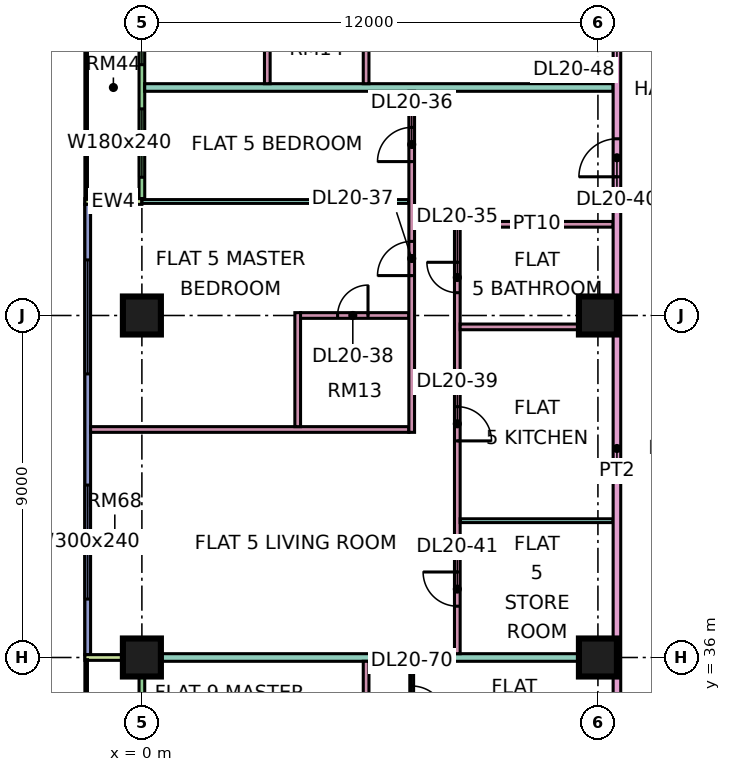
"""IFC4 building model, lengths in metres.
Left out: names, types, materials, properties, quantities, classifications, styles, units other than length and angle.
Written with IfcOpenShell. Run it as: python <this file> out.ifc"""

import sys

from ifc_helpers import new_model, si_unit, direction, frame, frame_2d, origin, origin_2d, place, context, subcontext, project, spatial, rectangle, extrude, element, fill, save


model = new_model("IFC4")
c1 = context("Model", 3, precision=1e-05, world=origin(), true_north=direction((0.0, 1.0)))
c2 = subcontext(c1, "Body", "Model", "MODEL_VIEW")
j1 = project(units=[si_unit("LENGTHUNIT", "METRE"), si_unit("PLANEANGLEUNIT", "RADIAN")], contexts=[c1])
p1 = place(None, origin())
s1 = spatial("IfcSite", under=j1, at=p1, CompositionType="ELEMENT")
p2 = place(p1, origin())
s2 = spatial("IfcBuilding", under=s1, at=p2, CompositionType="ELEMENT")
p3 = place(p2, frame((0.0, 0.0, 91.9)))
s3 = spatial("IfcBuildingStorey", under=s2, at=p3, CompositionType="ELEMENT", Elevation=91.9)
p4 = place(p3, frame((0.0, 36.0, 0.0), z_axis=(0.0, 0.0, 1.0), x_axis=(1.0, 0.0, 0.0)))
e1 = element("IfcColumn", 1, at=p4, inside=s3, PredefinedType="COLUMN", context=c2, shape_type="SweptSolid", body=[
    extrude(rectangle(XDim=1.0, YDim=1.0, at=origin_2d()), origin(), (0.0, 0.0, 1.0), 3.75),
])
for number, where, z_axis, x_axis in (
    (2, (0.0, 45.0, 0.0), (0.0, 0.0, 1.0), (1.0, 0.0, 0.0)),
    (3, (12.0, 36.0, 0.0), (0.0, 0.0, 1.0), (1.0, 0.0, 0.0)),
    (4, (12.0, 45.0, 0.0), (0.0, 0.0, 1.0), (1.0, 0.0, 0.0)),
):
    element("IfcColumn", number, at=place(p3, frame(where, z_axis=z_axis, x_axis=x_axis)), inside=s3, PredefinedType="COLUMN", context=c2, shape_type="SweptSolid", body=[
        extrude(rectangle(XDim=1.0, YDim=1.0, at=origin_2d()), origin(), (0.0, 0.0, 1.0), 3.75),
    ])
p5 = place(p3, frame((0.0, 61.425, 0.0), z_axis=(0.0, 0.0, 1.0), x_axis=(0.0, -1.0, 0.0)))
e5 = element("IfcWall", 5, at=p5, inside=s3, PredefinedType="SOLIDWALL", context=c2, shape_type="SweptSolid", body=[
    extrude(rectangle(XDim=13.35, YDim=0.15, at=frame_2d((6.675, 0.0))), origin(), (0.0, 0.0, 1.0), 3.35),
])
p6 = place(p5, frame((2.025, 0.0, 0.0)))
e6 = element("IfcOpeningElement", 6, at=p6, cuts=e5, PredefinedType="OPENING", context=c2, shape_type="SweptSolid", body=[
    extrude(rectangle(XDim=1.8, YDim=2.4, at=frame_2d((0.9, 1.2))), frame((0.0, 0.085, 0.0), z_axis=(0.0, -1.0, 0.0), x_axis=(1.0, 0.0, 0.0)), (0.0, 0.0, 1.0), 0.17),
])
p7 = place(p5, frame((5.025, 0.0, 0.45)))
e7 = element("IfcOpeningElement", 7, at=p7, cuts=e5, PredefinedType="OPENING", context=c2, shape_type="SweptSolid", body=[
    extrude(rectangle(XDim=1.2, YDim=2.4, at=frame_2d((0.6, 1.2))), frame((0.0, 0.085, 0.0), z_axis=(0.0, -1.0, 0.0), x_axis=(1.0, 0.0, 0.0)), (0.0, 0.0, 1.0), 0.17),
])
p8 = place(p5, frame((8.625, 0.0, 0.45)))
e8 = element("IfcOpeningElement", 8, at=p8, cuts=e5, PredefinedType="OPENING", context=c2, shape_type="SweptSolid", body=[
    extrude(rectangle(XDim=1.2, YDim=2.4, at=frame_2d((0.6, 1.2))), frame((0.0, 0.085, 0.0), z_axis=(0.0, -1.0, 0.0), x_axis=(1.0, 0.0, 0.0)), (0.0, 0.0, 1.0), 0.17),
])
p9 = place(p5, frame((10.988, 0.0, 0.45)))
e9 = element("IfcOpeningElement", 9, at=p9, cuts=e5, PredefinedType="OPENING", context=c2, shape_type="SweptSolid", body=[
    extrude(rectangle(XDim=1.8, YDim=2.4, at=frame_2d((0.9, 1.2))), frame((0.0, 0.085, 0.0), z_axis=(0.0, -1.0, 0.0), x_axis=(1.0, 0.0, 0.0)), (0.0, 0.0, 1.0), 0.17),
])
p10 = place(p3, frame((-1.5, 48.0, 0.0), z_axis=(0.0, 0.0, 1.0), x_axis=(1.0, 0.0, 0.0)))
e10 = element("IfcWall", 10, at=p10, inside=s3, PredefinedType="SOLIDWALL", context=c2, shape_type="SweptSolid", body=[
    extrude(rectangle(XDim=1.5, YDim=0.15, at=frame_2d((0.75, 0.0))), origin(), (0.0, 0.0, 1.0), 3.35),
])
p11 = place(p3, frame((-1.425, 47.925, 0.0), z_axis=(0.0, 0.0, 1.0), x_axis=(0.0, -1.0, 0.0)))
e11 = element("IfcWall", 11, at=p11, inside=s3, PredefinedType="SOLIDWALL", context=c2, shape_type="SweptSolid", body=[
    extrude(rectangle(XDim=11.85, YDim=0.15, at=frame_2d((5.925, 0.0))), origin(), (0.0, 0.0, 1.0), 3.35),
])
p12 = place(p11, frame((1.462, 0.0, 0.45)))
e12 = element("IfcOpeningElement", 12, at=p12, cuts=e11, PredefinedType="OPENING", context=c2, shape_type="SweptSolid", body=[
    extrude(rectangle(XDim=3.0, YDim=2.4, at=frame_2d((1.5, 1.2))), frame((0.0, 0.085, 0.0), z_axis=(0.0, -1.0, 0.0), x_axis=(1.0, 0.0, 0.0)), (0.0, 0.0, 1.0), 0.17),
])
p13 = place(p11, frame((7.387, 0.0, 0.45)))
e13 = element("IfcOpeningElement", 13, at=p13, cuts=e11, PredefinedType="OPENING", context=c2, shape_type="SweptSolid", body=[
    extrude(rectangle(XDim=3.0, YDim=2.4, at=frame_2d((1.5, 1.2))), frame((0.0, 0.085, 0.0), z_axis=(0.0, -1.0, 0.0), x_axis=(1.0, 0.0, 0.0)), (0.0, 0.0, 1.0), 0.17),
])
p14 = place(p3, frame((0.0, 35.925, 0.0), z_axis=(0.0, 0.0, 1.0), x_axis=(0.0, -1.0, 0.0)))
e14 = element("IfcWall", 14, at=p14, inside=s3, PredefinedType="SOLIDWALL", context=c2, shape_type="SweptSolid", body=[
    extrude(rectangle(XDim=11.85, YDim=0.15, at=frame_2d((5.925, 0.0))), origin(), (0.0, 0.0, 1.0), 3.35),
])
p15 = place(p14, frame((2.325, 0.0, 0.0)))
e15 = element("IfcOpeningElement", 15, at=p15, cuts=e14, PredefinedType="OPENING", context=c2, shape_type="SweptSolid", body=[
    extrude(rectangle(XDim=1.8, YDim=2.4, at=frame_2d((0.9, 1.2))), frame((0.0, 0.085, 0.0), z_axis=(0.0, -1.0, 0.0), x_axis=(1.0, 0.0, 0.0)), (0.0, 0.0, 1.0), 0.17),
])
p16 = place(p14, frame((7.125, 0.0, 0.45)))
e16 = element("IfcOpeningElement", 16, at=p16, cuts=e14, PredefinedType="OPENING", context=c2, shape_type="SweptSolid", body=[
    extrude(rectangle(XDim=3.0, YDim=2.4, at=frame_2d((1.5, 1.2))), frame((0.0, 0.085, 0.0), z_axis=(0.0, -1.0, 0.0), x_axis=(1.0, 0.0, 0.0)), (0.0, 0.0, 1.0), 0.17),
])
p17 = place(p3, frame((-1.5, 36.0, 0.0), z_axis=(0.0, 0.0, 1.0), x_axis=(1.0, 0.0, 0.0)))
e17 = element("IfcWall", 17, at=p17, inside=s3, PredefinedType="SOLIDWALL", context=c2, shape_type="SweptSolid", body=[
    extrude(rectangle(XDim=1.5, YDim=0.15, at=frame_2d((0.75, 0.0))), origin(), (0.0, 0.0, 1.0), 3.35),
])
e18 = element("IfcWall", 18, at=p4, inside=s3, PredefinedType="PARTITIONING", context=c2, shape_type="SweptSolid", body=[
    extrude(rectangle(XDim=12.4, YDim=0.2, at=frame_2d((6.2, 0.0))), origin(), (0.0, 0.0, 1.0), 3.35),
])
p18 = place(p3, frame((-1.35, 42.0, 0.0), z_axis=(0.0, 0.0, 1.0), x_axis=(1.0, 0.0, 0.0)))
e19 = element("IfcWall", 19, at=p18, inside=s3, PredefinedType="PARTITIONING", context=c2, shape_type="SweptSolid", body=[
    extrude(rectangle(XDim=8.375, YDim=0.15, at=frame_2d((4.188, 0.0))), origin(), (0.0, 0.0, 1.0), 3.35),
])
p19 = place(p3, frame((0.0, 48.0, 0.0), z_axis=(0.0, 0.0, 1.0), x_axis=(1.0, 0.0, 0.0)))
e20 = element("IfcWall", 20, at=p19, inside=s3, PredefinedType="PARTITIONING", context=c2, shape_type="SweptSolid", body=[
    extrude(rectangle(XDim=7.025, YDim=0.1, at=frame_2d((3.512, 0.0))), origin(), (0.0, 0.0, 1.0), 3.35),
])
p20 = place(p3, frame((0.074, 51.0, 0.0), z_axis=(0.0, 0.0, 1.0), x_axis=(1.0, 0.0, 0.0)))
e21 = element("IfcWall", 21, at=p20, inside=s3, PredefinedType="PARTITIONING", context=c2, shape_type="SweptSolid", body=[
    extrude(rectangle(XDim=12.326, YDim=0.2, at=frame_2d((6.163, 0.0))), origin(), (0.0, 0.0, 1.0), 3.35),
])
p21 = place(p3, frame((3.3, 51.1, 0.0), z_axis=(0.0, 0.0, 1.0), x_axis=(0.0, 1.0, 0.0)))
e22 = element("IfcWall", 22, at=p21, inside=s3, PredefinedType="PARTITIONING", context=c2, shape_type="SweptSolid", body=[
    extrude(rectangle(XDim=2.975, YDim=0.15, at=frame_2d((1.487, 0.0))), origin(), (0.0, 0.0, 1.0), 3.35),
])
p22 = place(p3, frame((4.1, 42.075, 0.0), z_axis=(0.0, 0.0, 1.0), x_axis=(0.0, 1.0, 0.0)))
e23 = element("IfcWall", 23, at=p22, inside=s3, PredefinedType="PARTITIONING", context=c2, shape_type="SweptSolid", body=[
    extrude(rectangle(XDim=3.0, YDim=0.15, at=frame_2d((1.5, 0.0))), origin(), (0.0, 0.0, 1.0), 3.35),
])
p23 = place(p3, frame((4.175, 45.0, 0.0), z_axis=(0.0, 0.0, 1.0), x_axis=(1.0, 0.0, 0.0)))
e24 = element("IfcWall", 24, at=p23, inside=s3, PredefinedType="PARTITIONING", context=c2, shape_type="SweptSolid", body=[
    extrude(rectangle(XDim=2.85, YDim=0.15, at=frame_2d((1.425, 0.0))), origin(), (0.0, 0.0, 1.0), 3.35),
])
p24 = place(p23, frame((0.975, 0.0, 0.0)))
e25 = element("IfcOpeningElement", 25, at=p24, cuts=e24, PredefinedType="OPENING", context=c2, shape_type="SweptSolid", body=[
    extrude(rectangle(XDim=0.8, YDim=2.1, at=frame_2d((0.4, 1.05))), frame((0.0, 0.085, 0.0), z_axis=(0.0, -1.0, 0.0), x_axis=(1.0, 0.0, 0.0)), (0.0, 0.0, 1.0), 0.17),
])
p25 = place(p3, frame((5.9, 29.925, 0.0), z_axis=(0.0, 0.0, 1.0), x_axis=(0.0, 1.0, 0.0)))
e26 = element("IfcWall", 26, at=p25, inside=s3, PredefinedType="PARTITIONING", context=c2, shape_type="SweptSolid", body=[
    extrude(rectangle(XDim=5.975, YDim=0.15, at=frame_2d((2.987, 0.0))), origin(), (0.0, 0.0, 1.0), 3.35),
])
p26 = place(p25, frame((4.125, 0.0, 0.0)))
e27 = element("IfcOpeningElement", 27, at=p26, cuts=e26, PredefinedType="OPENING", context=c2, shape_type="SweptSolid", body=[
    extrude(rectangle(XDim=0.9, YDim=2.1, at=frame_2d((0.45, 1.05))), frame((0.0, 0.085, 0.0), z_axis=(0.0, -1.0, 0.0), x_axis=(1.0, 0.0, 0.0)), (0.0, 0.0, 1.0), 0.17),
])
p27 = place(p3, frame((5.9, 51.1, 0.0), z_axis=(0.0, 0.0, 1.0), x_axis=(0.0, 1.0, 0.0)))
e28 = element("IfcWall", 28, at=p27, inside=s3, PredefinedType="PARTITIONING", context=c2, shape_type="SweptSolid", body=[
    extrude(rectangle(XDim=8.95, YDim=0.15, at=frame_2d((4.475, 0.0))), origin(), (0.0, 0.0, 1.0), 3.35),
])
p28 = place(p27, frame((6.95, 0.0, 0.0)))
e29 = element("IfcOpeningElement", 29, at=p28, cuts=e28, PredefinedType="OPENING", context=c2, shape_type="SweptSolid", body=[
    extrude(rectangle(XDim=0.9, YDim=2.1, at=frame_2d((0.45, 1.05))), frame((0.0, 0.085, 0.0), z_axis=(0.0, -1.0, 0.0), x_axis=(1.0, 0.0, 0.0)), (0.0, 0.0, 1.0), 0.17),
])
p29 = place(p27, frame((3.95, 0.0, 0.0)))
e30 = element("IfcOpeningElement", 30, at=p29, cuts=e28, PredefinedType="OPENING", context=c2, shape_type="SweptSolid", body=[
    extrude(rectangle(XDim=0.9, YDim=2.1, at=frame_2d((0.45, 1.05))), frame((0.0, 0.085, 0.0), z_axis=(0.0, -1.0, 0.0), x_axis=(1.0, 0.0, 0.0)), (0.0, 0.0, 1.0), 0.17),
])
p30 = place(p3, frame((7.1, 33.65, 0.0), z_axis=(0.0, 0.0, 1.0), x_axis=(0.0, 1.0, 0.0)))
e31 = element("IfcWall", 31, at=p30, inside=s3, PredefinedType="PARTITIONING", context=c2, shape_type="SweptSolid", body=[
    extrude(rectangle(XDim=2.25, YDim=0.1, at=frame_2d((1.125, 0.0))), origin(), (0.0, 0.0, 1.0), 3.35),
])
p31 = place(p30, frame((0.7, 0.0, 0.0)))
e32 = element("IfcOpeningElement", 32, at=p31, cuts=e31, PredefinedType="OPENING", context=c2, shape_type="SweptSolid", body=[
    extrude(rectangle(XDim=0.9, YDim=2.1, at=frame_2d((0.45, 1.05))), frame((0.0, 0.06, 0.0), z_axis=(0.0, -1.0, 0.0), x_axis=(1.0, 0.0, 0.0)), (0.0, 0.0, 1.0), 0.12),
])
p32 = place(p3, frame((7.1, 41.925, 0.0), z_axis=(0.0, 0.0, 1.0), x_axis=(0.0, 1.0, 0.0)))
e33 = element("IfcWall", 33, at=p32, inside=s3, PredefinedType="PARTITIONING", context=c2, shape_type="SweptSolid", body=[
    extrude(rectangle(XDim=8.975, YDim=0.15, at=frame_2d((4.487, 0.0))), origin(), (0.0, 0.0, 1.0), 3.35),
])
p33 = place(p32, frame((7.125, 0.0, 0.0)))
e34 = element("IfcOpeningElement", 34, at=p33, cuts=e33, PredefinedType="OPENING", context=c2, shape_type="SweptSolid", body=[
    extrude(rectangle(XDim=0.9, YDim=2.1, at=frame_2d((0.45, 1.05))), frame((0.0, 0.085, 0.0), z_axis=(0.0, -1.0, 0.0), x_axis=(1.0, 0.0, 0.0)), (0.0, 0.0, 1.0), 0.17),
])
p34 = place(p32, frame((4.125, 0.0, 0.0)))
e35 = element("IfcOpeningElement", 35, at=p34, cuts=e33, PredefinedType="OPENING", context=c2, shape_type="SweptSolid", body=[
    extrude(rectangle(XDim=0.9, YDim=2.1, at=frame_2d((0.45, 1.05))), frame((0.0, 0.085, 0.0), z_axis=(0.0, -1.0, 0.0), x_axis=(1.0, 0.0, 0.0)), (0.0, 0.0, 1.0), 0.17),
])
p35 = place(p3, frame((8.3, 36.1, 0.0), z_axis=(0.0, 0.0, 1.0), x_axis=(0.0, 1.0, 0.0)))
e36 = element("IfcWall", 36, at=p35, inside=s3, PredefinedType="PARTITIONING", context=c2, shape_type="SweptSolid", body=[
    extrude(rectangle(XDim=11.375, YDim=0.15, at=frame_2d((5.688, 0.0))), origin(), (0.0, 0.0, 1.0), 3.35),
])
p36 = place(p35, frame((9.5, 0.0, 0.0)))
e37 = element("IfcOpeningElement", 37, at=p36, cuts=e36, PredefinedType="OPENING", context=c2, shape_type="SweptSolid", body=[
    extrude(rectangle(XDim=0.8, YDim=2.1, at=frame_2d((0.4, 1.05))), frame((0.0, 0.085, 0.0), z_axis=(0.0, -1.0, 0.0), x_axis=(1.0, 0.0, 0.0)), (0.0, 0.0, 1.0), 0.17),
])
p37 = place(p35, frame((5.6, 0.0, 0.0)))
e38 = element("IfcOpeningElement", 38, at=p37, cuts=e36, PredefinedType="OPENING", context=c2, shape_type="SweptSolid", body=[
    extrude(rectangle(XDim=0.9, YDim=2.1, at=frame_2d((0.45, 1.05))), frame((0.0, 0.085, 0.0), z_axis=(0.0, -1.0, 0.0), x_axis=(1.0, 0.0, 0.0)), (0.0, 0.0, 1.0), 0.17),
])
p38 = place(p35, frame((1.25, 0.0, 0.0)))
e39 = element("IfcOpeningElement", 39, at=p38, cuts=e36, PredefinedType="OPENING", context=c2, shape_type="SweptSolid", body=[
    extrude(rectangle(XDim=0.9, YDim=2.1, at=frame_2d((0.45, 1.05))), frame((0.0, 0.085, 0.0), z_axis=(0.0, -1.0, 0.0), x_axis=(1.0, 0.0, 0.0)), (0.0, 0.0, 1.0), 0.17),
])
p39 = place(p3, frame((8.375, 39.6, 0.0), z_axis=(0.0, 0.0, 1.0), x_axis=(1.0, 0.0, 0.0)))
e40 = element("IfcWall", 40, at=p39, inside=s3, PredefinedType="PARTITIONING", context=c2, shape_type="SweptSolid", body=[
    extrude(rectangle(XDim=4.025, YDim=0.1, at=frame_2d((2.012, 0.0))), origin(), (0.0, 0.0, 1.0), 3.35),
])
for number, where, z_axis, x_axis in (
    (41, (8.375, 44.7, 0.0), (0.0, 0.0, 1.0), (1.0, 0.0, 0.0)),
    (42, (8.375, 47.4, 0.0), (0.0, 0.0, 1.0), (1.0, 0.0, 0.0)),
):
    element("IfcWall", number, at=place(p3, frame(where, z_axis=z_axis, x_axis=x_axis)), inside=s3, PredefinedType="PARTITIONING", context=c2, shape_type="SweptSolid", body=[
        extrude(rectangle(XDim=4.025, YDim=0.15, at=frame_2d((2.012, 0.0))), origin(), (0.0, 0.0, 1.0), 3.35),
    ])
p40 = place(p3, frame((12.5, 20.0, 0.0), z_axis=(0.0, 0.0, 1.0), x_axis=(0.0, 1.0, 0.0)))
e43 = element("IfcWall", 43, at=p40, inside=s3, PredefinedType="PARTITIONING", context=c2, shape_type="SweptSolid", body=[
    extrude(rectangle(XDim=43.0, YDim=0.2, at=frame_2d((21.5, 0.0))), origin(), (0.0, 0.0, 1.0), 3.35),
])
p41 = place(p40, frame((28.65, 0.0, 0.0)))
e44 = element("IfcOpeningElement", 44, at=p41, cuts=e43, PredefinedType="OPENING", context=c2, shape_type="SweptSolid", body=[
    extrude(rectangle(XDim=1.0, YDim=2.1, at=frame_2d((0.5, 1.05))), frame((0.0, 0.11, 0.0), z_axis=(0.0, -1.0, 0.0), x_axis=(1.0, 0.0, 0.0)), (0.0, 0.0, 1.0), 0.22),
])
p42 = place(p40, frame((32.1, 0.0, 0.0)))
e45 = element("IfcOpeningElement", 45, at=p42, cuts=e43, PredefinedType="OPENING", context=c2, shape_type="SweptSolid", body=[
    extrude(rectangle(XDim=1.0, YDim=2.1, at=frame_2d((0.5, 1.05))), frame((0.0, 0.11, 0.0), z_axis=(0.0, -1.0, 0.0), x_axis=(1.0, 0.0, 0.0)), (0.0, 0.0, 1.0), 0.22),
])
p43 = place(p40, frame((0.6, 0.0, 0.0)))
e46 = element("IfcOpeningElement", 46, at=p43, cuts=e43, PredefinedType="OPENING", context=c2, shape_type="SweptSolid", body=[
    extrude(rectangle(XDim=1.2, YDim=2.1, at=frame_2d((0.6, 1.05))), frame((0.0, 0.11, 0.0), z_axis=(0.0, -1.0, 0.0), x_axis=(1.0, 0.0, 0.0)), (0.0, 0.0, 1.0), 0.22),
])
p44 = place(p40, frame((11.1, 0.0, 0.0)))
e47 = element("IfcOpeningElement", 47, at=p44, cuts=e43, PredefinedType="OPENING", context=c2, shape_type="SweptSolid", body=[
    extrude(rectangle(XDim=1.0, YDim=2.1, at=frame_2d((0.5, 1.05))), frame((0.0, 0.11, 0.0), z_axis=(0.0, -1.0, 0.0), x_axis=(1.0, 0.0, 0.0)), (0.0, 0.0, 1.0), 0.22),
])
p45 = place(p8, origin())
e48 = element("IfcWindow", 48, at=p45, inside=s3, PartitioningType="SINGLE_PANEL", PredefinedType="WINDOW", context=c2, shape_type="SweptSolid", body=[
    extrude(rectangle(XDim=1.2, YDim=2.4, at=frame_2d((0.6, 1.2))), frame((0.0, 0.03, 0.0), z_axis=(0.0, -1.0, 0.0), x_axis=(1.0, 0.0, 0.0)), (0.0, 0.0, 1.0), 0.06),
])
fill(e8, e48)
p46 = place(p9, origin())
e49 = element("IfcWindow", 49, at=p46, inside=s3, PartitioningType="SINGLE_PANEL", PredefinedType="WINDOW", context=c2, shape_type="SweptSolid", body=[
    extrude(rectangle(XDim=1.8, YDim=2.4, at=frame_2d((0.9, 1.2))), frame((0.0, 0.03, 0.0), z_axis=(0.0, -1.0, 0.0), x_axis=(1.0, 0.0, 0.0)), (0.0, 0.0, 1.0), 0.06),
])
fill(e9, e49)
p47 = place(p12, origin())
e50 = element("IfcWindow", 50, at=p47, inside=s3, PartitioningType="SINGLE_PANEL", PredefinedType="WINDOW", context=c2, shape_type="SweptSolid", body=[
    extrude(rectangle(XDim=3.0, YDim=2.4, at=frame_2d((1.5, 1.2))), frame((0.0, 0.03, 0.0), z_axis=(0.0, -1.0, 0.0), x_axis=(1.0, 0.0, 0.0)), (0.0, 0.0, 1.0), 0.06),
])
fill(e12, e50)
p48 = place(p13, origin())
e51 = element("IfcWindow", 51, at=p48, inside=s3, PartitioningType="SINGLE_PANEL", PredefinedType="WINDOW", context=c2, shape_type="SweptSolid", body=[
    extrude(rectangle(XDim=3.0, YDim=2.4, at=frame_2d((1.5, 1.2))), frame((0.0, 0.03, 0.0), z_axis=(0.0, -1.0, 0.0), x_axis=(1.0, 0.0, 0.0)), (0.0, 0.0, 1.0), 0.06),
])
fill(e13, e51)
p49 = place(p36, frame((0.8, 0.0, 0.0), z_axis=(0.0, 0.0, 1.0), x_axis=(-1.0, 0.0, 0.0)))
e52 = element("IfcDoor", 52, at=p49, inside=s3, OperationType="SINGLE_SWING_RIGHT", PredefinedType="DOOR", context=c2, shape_type="SweptSolid", body=[
    extrude(rectangle(XDim=0.8, YDim=2.1, at=frame_2d((0.4, 1.05))), frame((0.0, 0.025, 0.0), z_axis=(0.0, -1.0, 0.0), x_axis=(1.0, 0.0, 0.0)), (0.0, 0.0, 1.0), 0.05),
])
fill(e37, e52)
p50 = place(p33, origin())
e53 = element("IfcDoor", 53, at=p50, inside=s3, OperationType="SINGLE_SWING_LEFT", PredefinedType="DOOR", context=c2, shape_type="SweptSolid", body=[
    extrude(rectangle(XDim=0.9, YDim=2.1, at=frame_2d((0.45, 1.05))), frame((0.0, 0.025, 0.0), z_axis=(0.0, -1.0, 0.0), x_axis=(1.0, 0.0, 0.0)), (0.0, 0.0, 1.0), 0.05),
])
fill(e34, e53)
p51 = place(p34, origin())
e54 = element("IfcDoor", 54, at=p51, inside=s3, OperationType="SINGLE_SWING_LEFT", PredefinedType="DOOR", context=c2, shape_type="SweptSolid", body=[
    extrude(rectangle(XDim=0.9, YDim=2.1, at=frame_2d((0.45, 1.05))), frame((0.0, 0.025, 0.0), z_axis=(0.0, -1.0, 0.0), x_axis=(1.0, 0.0, 0.0)), (0.0, 0.0, 1.0), 0.05),
])
fill(e35, e54)
p52 = place(p24, frame((0.8, 0.0, 0.0), z_axis=(0.0, 0.0, 1.0), x_axis=(-1.0, 0.0, 0.0)))
e55 = element("IfcDoor", 55, at=p52, inside=s3, OperationType="SINGLE_SWING_RIGHT", PredefinedType="DOOR", context=c2, shape_type="SweptSolid", body=[
    extrude(rectangle(XDim=0.8, YDim=2.1, at=frame_2d((0.4, 1.05))), frame((0.0, 0.025, 0.0), z_axis=(0.0, -1.0, 0.0), x_axis=(1.0, 0.0, 0.0)), (0.0, 0.0, 1.0), 0.05),
])
fill(e25, e55)
p53 = place(p37, frame((0.9, 0.0, 0.0), z_axis=(0.0, 0.0, 1.0), x_axis=(-1.0, 0.0, 0.0)))
e56 = element("IfcDoor", 56, at=p53, inside=s3, OperationType="SINGLE_SWING_LEFT", PredefinedType="DOOR", context=c2, shape_type="SweptSolid", body=[
    extrude(rectangle(XDim=0.9, YDim=2.1, at=frame_2d((0.45, 1.05))), frame((0.0, 0.025, 0.0), z_axis=(0.0, -1.0, 0.0), x_axis=(1.0, 0.0, 0.0)), (0.0, 0.0, 1.0), 0.05),
])
fill(e38, e56)
p54 = place(p41, origin())
e57 = element("IfcDoor", 57, at=p54, inside=s3, OperationType="SINGLE_SWING_LEFT", PredefinedType="DOOR", context=c2, shape_type="SweptSolid", body=[
    extrude(rectangle(XDim=1.0, YDim=2.1, at=frame_2d((0.5, 1.05))), frame((0.0, 0.025, 0.0), z_axis=(0.0, -1.0, 0.0), x_axis=(1.0, 0.0, 0.0)), (0.0, 0.0, 1.0), 0.05),
])
fill(e44, e57)
p55 = place(p38, frame((0.9, 0.0, 0.0), z_axis=(0.0, 0.0, 1.0), x_axis=(-1.0, 0.0, 0.0)))
e58 = element("IfcDoor", 58, at=p55, inside=s3, OperationType="SINGLE_SWING_RIGHT", PredefinedType="DOOR", context=c2, shape_type="SweptSolid", body=[
    extrude(rectangle(XDim=0.9, YDim=2.1, at=frame_2d((0.45, 1.05))), frame((0.0, 0.025, 0.0), z_axis=(0.0, -1.0, 0.0), x_axis=(1.0, 0.0, 0.0)), (0.0, 0.0, 1.0), 0.05),
])
fill(e39, e58)
p56 = place(p31, frame((0.9, 0.0, 0.0), z_axis=(0.0, 0.0, 1.0), x_axis=(-1.0, 0.0, 0.0)))
e59 = element("IfcDoor", 59, at=p56, inside=s3, OperationType="SINGLE_SWING_LEFT", PredefinedType="DOOR", context=c2, shape_type="SweptSolid", body=[
    extrude(rectangle(XDim=0.9, YDim=2.1, at=frame_2d((0.45, 1.05))), frame((0.0, 0.025, 0.0), z_axis=(0.0, -1.0, 0.0), x_axis=(1.0, 0.0, 0.0)), (0.0, 0.0, 1.0), 0.05),
])
fill(e32, e59)
save(model, sys.argv[1])
